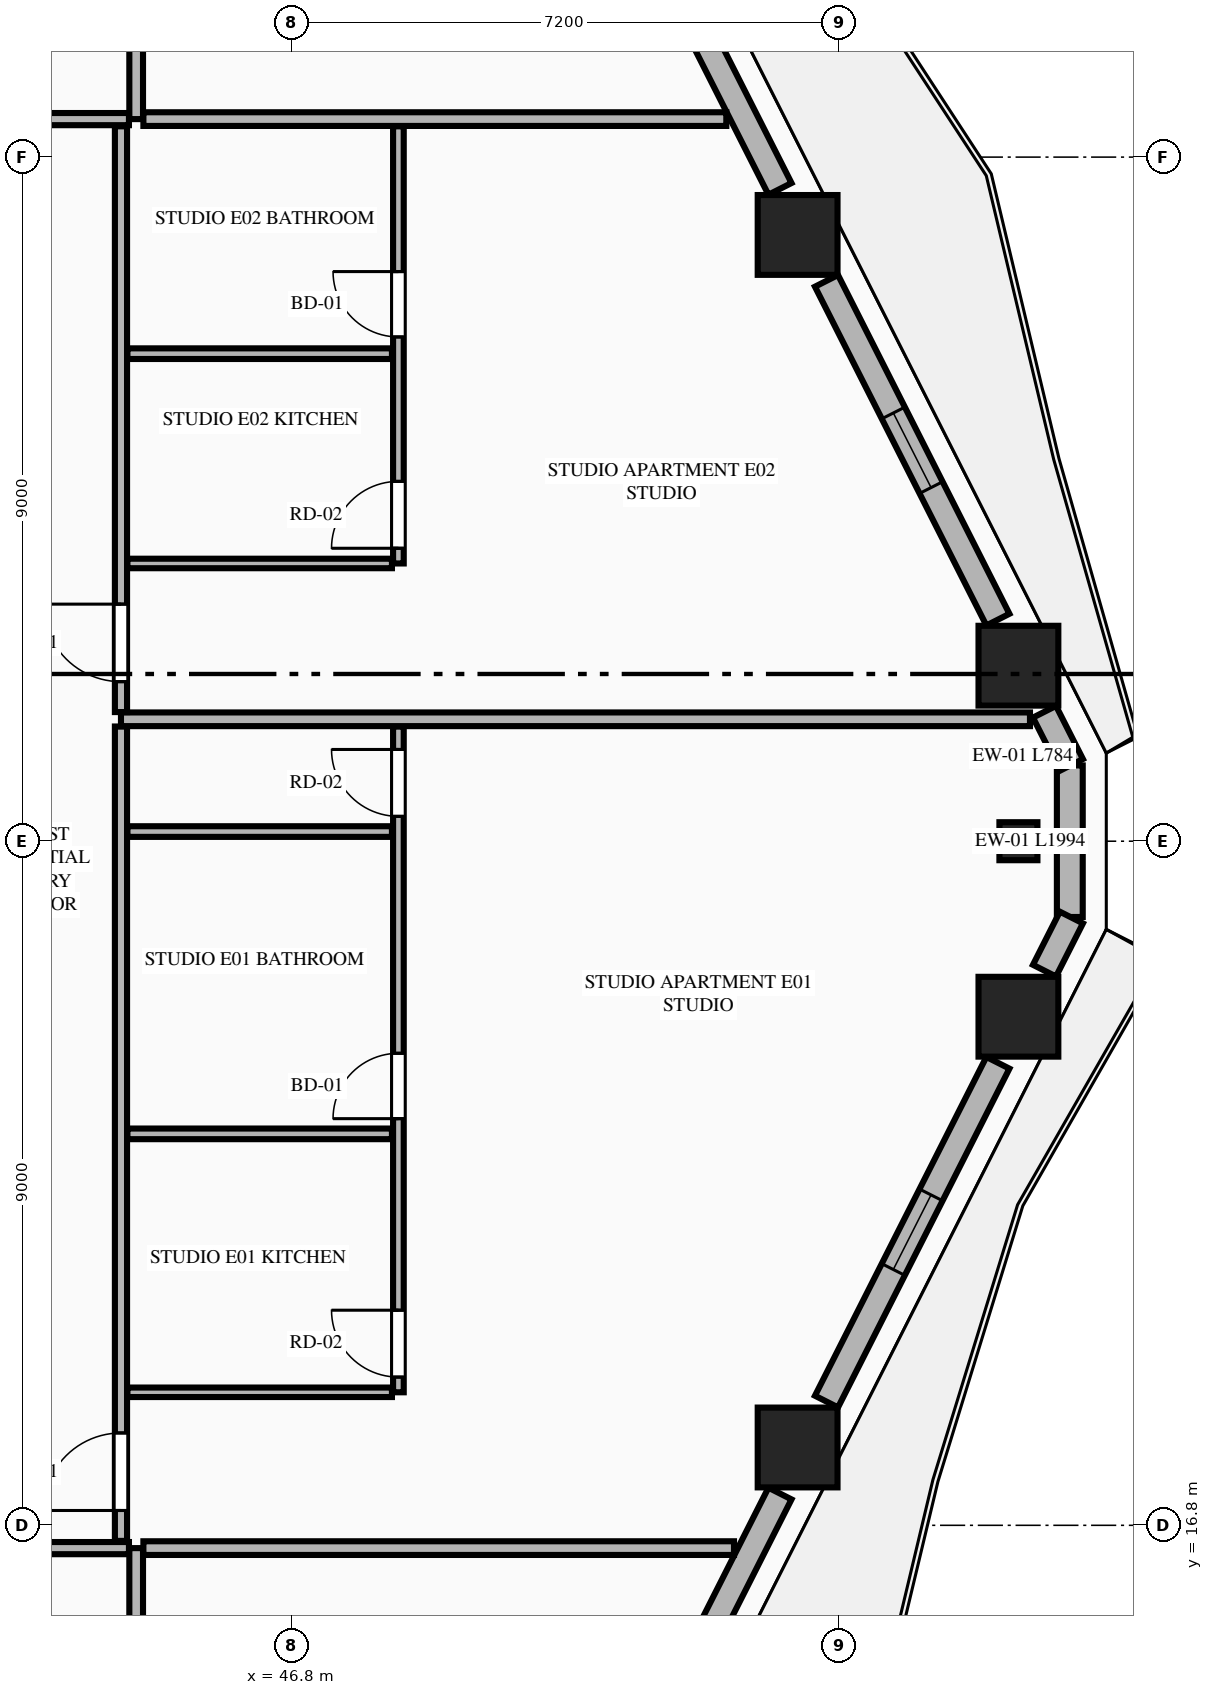
"""IFC4 building model, lengths in metres.
Left out: names, types, materials, properties, quantities, classifications, styles, units other than length and angle.
Written with IfcOpenShell. Run it as: python <this file> out.ifc"""

import sys

from ifc_helpers import new_model, si_unit, direction, frame, frame_2d, origin, origin_2d, place, context, subcontext, project, spatial, rectangle, extrude, element, fill, save


model = new_model("IFC4")
c1 = context("Model", 3, precision=1e-05, world=origin(), true_north=direction((0.0, 1.0)))
c2 = subcontext(c1, "Body", "Model", "MODEL_VIEW")
j1 = project(units=[si_unit("LENGTHUNIT", "METRE"), si_unit("PLANEANGLEUNIT", "RADIAN")], contexts=[c1])
p1 = place(None, origin())
s1 = spatial("IfcSite", under=j1, at=p1, CompositionType="ELEMENT")
p2 = place(p1, origin())
s2 = spatial("IfcBuilding", under=s1, at=p2, CompositionType="ELEMENT")
p3 = place(p2, frame((0.0, 0.0, 144.55)))
s3 = spatial("IfcBuildingStorey", under=s2, at=p3, CompositionType="ELEMENT", Elevation=144.55)
for number, where, z_axis, x_axis in (
    (1, (53.452, 17.824, 0.0), (0.0, 0.0, 1.0), (1.0, 0.0, 0.0)),
    (2, (56.357, 23.491, 0.0), (0.0, 0.0, 1.0), (1.0, 0.0, 0.0)),
    (3, (56.357, 28.109, 0.0), (0.0, 0.0, 1.0), (1.0, 0.0, 0.0)),
    (4, (53.452, 33.776, 0.0), (0.0, 0.0, 1.0), (1.0, 0.0, 0.0)),
):
    element("IfcColumn", number, at=place(p3, frame(where, z_axis=z_axis, x_axis=x_axis)), inside=s3, PredefinedType="COLUMN", context=c2, shape_type="SweptSolid", body=[
        extrude(rectangle(XDim=1.05, YDim=1.05, at=origin_2d()), origin(), (0.0, 0.0, 1.0), 3.55),
    ])
p4 = place(p3, frame((56.357, 25.8, 0.0), z_axis=(0.0, 0.0, 1.0), x_axis=(0.0, 1.0, 0.0)))
e5 = element("IfcColumn", 5, at=p4, inside=s3, PredefinedType="PILASTER", context=c2, shape_type="SweptSolid", body=[
    extrude(rectangle(XDim=0.5, YDim=0.35, at=origin_2d()), origin(), (0.0, 0.0, 1.0), 3.55),
])
p5 = place(p3, frame((57.033, 24.803, 0.0), z_axis=(0.0, 0.0, 1.0), x_axis=(0.0, 1.0, 0.0)))
e6 = element("IfcWall", 6, at=p5, inside=s3, PredefinedType="STANDARD", context=c2, shape_type="SweptSolid", body=[
    extrude(rectangle(XDim=1.994, YDim=0.34, at=frame_2d((0.997, 0.0))), origin(), (0.0, 0.0, 1.0), 3.27),
])
p6 = place(p3, frame((50.863, 12.561, 0.0), z_axis=(0.0, 0.0, 1.0), x_axis=(0.451567731634, 0.892236842855, 0.0)))
e7 = element("IfcWall", 7, at=p6, inside=s3, PredefinedType="STANDARD", context=c2, shape_type="SweptSolid", body=[
    extrude(rectangle(XDim=5.219, YDim=0.34, at=frame_2d((2.61, 0.0))), origin(), (0.0, 0.0, 1.0), 2.727),
])
p7 = place(p6, frame((1.532, 0.0, 0.0)))
e8 = element("IfcOpeningElement", 8, at=p7, cuts=e7, PredefinedType="OPENING", context=c2, shape_type="SweptSolid", body=[
    extrude(rectangle(XDim=1.1, YDim=2.25, at=frame_2d((0.55, 1.125))), frame((0.0, 0.18, 0.0), z_axis=(0.0, -1.0, 0.0), x_axis=(1.0, 0.0, 0.0)), (0.0, 0.0, 1.0), 0.36),
])
p8 = place(p3, frame((53.832, 18.428, 0.0), z_axis=(0.0, 0.0, 1.0), x_axis=(0.451431617681, 0.892305718102, 0.0)))
e9 = element("IfcWall", 9, at=p8, inside=s3, PredefinedType="STANDARD", context=c2, shape_type="SweptSolid", body=[
    extrude(rectangle(XDim=4.995, YDim=0.34, at=frame_2d((2.498, 0.0))), origin(), (0.0, 0.0, 1.0), 2.727),
])
p9 = place(p8, frame((1.947, 0.0, 0.75)))
e10 = element("IfcOpeningElement", 10, at=p9, cuts=e9, PredefinedType="OPENING", context=c2, shape_type="SweptSolid", body=[
    extrude(rectangle(XDim=1.1, YDim=1.827, at=frame_2d((0.55, 0.914))), frame((0.0, 0.18, 0.0), z_axis=(0.0, -1.0, 0.0), x_axis=(1.0, 0.0, 0.0)), (0.0, 0.0, 1.0), 0.36),
])
for number, where, z_axis, x_axis in (
    (11, (56.7, 24.097, 0.0), (0.0, 0.0, 1.0), (0.452, 0.892, 0.0)),
    (12, (57.054, 26.804, 0.0), (0.0, 0.0, 1.0), (-0.452, 0.892, 0.0)),
):
    element("IfcWall", number, at=place(p3, frame(where, z_axis=z_axis, x_axis=x_axis)), inside=s3, PredefinedType="STANDARD", context=c2, shape_type="SweptSolid", body=[
        extrude(rectangle(XDim=0.783, YDim=0.34, at=frame_2d((0.392, 0.0))), origin(), (0.0, 0.0, 1.0), 3.27),
    ])
p10 = place(p3, frame((56.087, 28.715, 0.0), z_axis=(0.0, 0.0, 1.0), x_axis=(-0.451431617681, 0.892305718102, 0.0)))
e13 = element("IfcWall", 13, at=p10, inside=s3, PredefinedType="STANDARD", context=c2, shape_type="SweptSolid", body=[
    extrude(rectangle(XDim=4.995, YDim=0.34, at=frame_2d((2.498, 0.0))), origin(), (0.0, 0.0, 1.0), 2.727),
])
p11 = place(p10, frame((1.947, 0.0, 0.75)))
e14 = element("IfcOpeningElement", 14, at=p11, cuts=e13, PredefinedType="OPENING", context=c2, shape_type="SweptSolid", body=[
    extrude(rectangle(XDim=1.1, YDim=1.827, at=frame_2d((0.55, 0.914))), frame((0.0, 0.18, 0.0), z_axis=(0.0, -1.0, 0.0), x_axis=(1.0, 0.0, 0.0)), (0.0, 0.0, 1.0), 0.36),
])
p12 = place(p3, frame((53.22, 34.382, 0.0), z_axis=(0.0, 0.0, 1.0), x_axis=(-0.451567731634, 0.892236842855, 0.0)))
e15 = element("IfcWall", 15, at=p12, inside=s3, PredefinedType="STANDARD", context=c2, shape_type="SweptSolid", body=[
    extrude(rectangle(XDim=5.219, YDim=0.34, at=frame_2d((2.61, 0.0))), origin(), (0.0, 0.0, 1.0), 2.727),
])
p13 = place(p12, frame((2.699, 0.0, 0.0)))
e16 = element("IfcOpeningElement", 16, at=p13, cuts=e15, PredefinedType="OPENING", context=c2, shape_type="SweptSolid", body=[
    extrude(rectangle(XDim=1.1, YDim=2.25, at=frame_2d((0.55, 1.125))), frame((0.0, 0.18, 0.0), z_axis=(0.0, -1.0, 0.0), x_axis=(1.0, 0.0, 0.0)), (0.0, 0.0, 1.0), 0.36),
])
p14 = place(p3, frame((44.75, 4.105, 0.0), z_axis=(0.0, 0.0, 1.0), x_axis=(0.0, 1.0, 0.0)))
e17 = element("IfcWall", 17, at=p14, inside=s3, PredefinedType="PARTITIONING", context=c2, shape_type="SweptSolid", body=[
    extrude(rectangle(XDim=12.395, YDim=0.18, at=frame_2d((6.198, 0.0))), origin(), (0.0, 0.0, 1.0), 3.27),
])
p15 = place(p3, frame((20.145, 16.5, 0.0), z_axis=(0.0, 0.0, 1.0), x_axis=(1.0, 0.0, 0.0)))
e18 = element("IfcWall", 18, at=p15, inside=s3, PredefinedType="PARTITIONING", context=c2, shape_type="SweptSolid", body=[
    extrude(rectangle(XDim=24.51, YDim=0.16, at=frame_2d((12.255, 0.0))), origin(), (0.0, 0.0, 1.0), 3.27),
])
p16 = place(p15, frame((0.405, 0.0, 0.0)))
e19 = element("IfcOpeningElement", 19, at=p16, cuts=e18, PredefinedType="OPENING", context=c2, shape_type="SweptSolid", body=[
    extrude(rectangle(XDim=1.35, YDim=2.35, at=frame_2d((0.675, 1.175))), frame((0.0, 0.09, 0.0), z_axis=(0.0, -1.0, 0.0), x_axis=(1.0, 0.0, 0.0)), (0.0, 0.0, 1.0), 0.18),
])
p17 = place(p3, frame((44.75, 35.3, 0.0), z_axis=(0.0, 0.0, 1.0), x_axis=(0.0, 1.0, 0.0)))
e20 = element("IfcWall", 20, at=p17, inside=s3, PredefinedType="PARTITIONING", context=c2, shape_type="SweptSolid", body=[
    extrude(rectangle(XDim=12.195, YDim=0.18, at=frame_2d((6.098, 0.0))), origin(), (0.0, 0.0, 1.0), 3.27),
])
p18 = place(p3, frame((20.145, 35.3, 0.0), z_axis=(0.0, 0.0, 1.0), x_axis=(1.0, 0.0, 0.0)))
e21 = element("IfcWall", 21, at=p18, inside=s3, PredefinedType="PARTITIONING", context=c2, shape_type="SweptSolid", body=[
    extrude(rectangle(XDim=24.51, YDim=0.16, at=frame_2d((12.255, 0.0))), origin(), (0.0, 0.0, 1.0), 3.27),
])
p19 = place(p18, frame((0.405, 0.0, 0.0)))
e22 = element("IfcOpeningElement", 22, at=p19, cuts=e21, PredefinedType="OPENING", context=c2, shape_type="SweptSolid", body=[
    extrude(rectangle(XDim=1.35, YDim=2.35, at=frame_2d((0.675, 1.175))), frame((0.0, 0.09, 0.0), z_axis=(0.0, -1.0, 0.0), x_axis=(1.0, 0.0, 0.0)), (0.0, 0.0, 1.0), 0.18),
])
p20 = place(p3, frame((44.845, 16.5, 0.0), z_axis=(0.0, 0.0, 1.0), x_axis=(1.0, 0.0, 0.0)))
e23 = element("IfcWall", 23, at=p20, inside=s3, PredefinedType="PARTITIONING", context=c2, shape_type="SweptSolid", body=[
    extrude(rectangle(XDim=7.77, YDim=0.18, at=frame_2d((3.885, 0.0))), origin(), (0.0, 0.0, 1.0), 3.27),
])
p21 = place(p3, frame((44.845, 35.3, 0.0), z_axis=(0.0, 0.0, 1.0), x_axis=(1.0, 0.0, 0.0)))
e24 = element("IfcWall", 24, at=p21, inside=s3, PredefinedType="PARTITIONING", context=c2, shape_type="SweptSolid", body=[
    extrude(rectangle(XDim=7.669, YDim=0.18, at=frame_2d((3.834, 0.0))), origin(), (0.0, 0.0, 1.0), 3.27),
])
p22 = place(p3, frame((44.55, 16.595, 0.0), z_axis=(0.0, 0.0, 1.0), x_axis=(0.0, 1.0, 0.0)))
e25 = element("IfcWall", 25, at=p22, inside=s3, PredefinedType="PARTITIONING", context=c2, shape_type="SweptSolid", body=[
    extrude(rectangle(XDim=10.714, YDim=0.16, at=frame_2d((5.357, 0.0))), origin(), (0.0, 0.0, 1.0), 3.27),
])
p23 = place(p22, frame((0.4, 0.0, 0.0)))
e26 = element("IfcOpeningElement", 26, at=p23, cuts=e25, PredefinedType="OPENING", context=c2, shape_type="SweptSolid", body=[
    extrude(rectangle(XDim=1.02, YDim=2.25, at=frame_2d((0.51, 1.125))), frame((0.0, 0.09, 0.0), z_axis=(0.0, -1.0, 0.0), x_axis=(1.0, 0.0, 0.0)), (0.0, 0.0, 1.0), 0.18),
])
p24 = place(p3, frame((44.635, 18.55, 0.0), z_axis=(0.0, 0.0, 1.0), x_axis=(1.0, 0.0, 0.0)))
e27 = element("IfcWall", 27, at=p24, inside=s3, PredefinedType="PARTITIONING", context=c2, shape_type="SweptSolid", body=[
    extrude(rectangle(XDim=3.48, YDim=0.125, at=frame_2d((1.74, 0.0))), origin(), (0.0, 0.0, 1.0), 2.652),
])
p25 = place(p3, frame((48.2, 18.55, 0.0), z_axis=(0.0, 0.0, 1.0), x_axis=(0.0, 1.0, 0.0)))
e28 = element("IfcWall", 28, at=p25, inside=s3, PredefinedType="PLUMBINGWALL", context=c2, shape_type="SweptSolid", body=[
    extrude(rectangle(XDim=8.759, YDim=0.14, at=frame_2d((4.379, 0.0))), origin(), (0.0, 0.0, 1.0), 3.27),
])
p26 = place(p25, frame((3.6, 0.0, 0.0)))
e29 = element("IfcOpeningElement", 29, at=p26, cuts=e28, PredefinedType="OPENING", context=c2, shape_type="SweptSolid", body=[
    extrude(rectangle(XDim=0.86, YDim=2.1, at=frame_2d((0.43, 1.05))), frame((0.0, 0.08, 0.0), z_axis=(0.0, -1.0, 0.0), x_axis=(1.0, 0.0, 0.0)), (0.0, 0.0, 1.0), 0.16),
])
p27 = place(p25, frame((7.577, 0.0, 0.0)))
e30 = element("IfcOpeningElement", 30, at=p27, cuts=e28, PredefinedType="OPENING", context=c2, shape_type="SweptSolid", body=[
    extrude(rectangle(XDim=0.88, YDim=2.15, at=frame_2d((0.44, 1.075))), frame((0.0, 0.08, 0.0), z_axis=(0.0, -1.0, 0.0), x_axis=(1.0, 0.0, 0.0)), (0.0, 0.0, 1.0), 0.16),
])
p28 = place(p25, frame((0.2, 0.0, 0.0)))
e31 = element("IfcOpeningElement", 31, at=p28, cuts=e28, PredefinedType="OPENING", context=c2, shape_type="SweptSolid", body=[
    extrude(rectangle(XDim=0.88, YDim=2.15, at=frame_2d((0.44, 1.075))), frame((0.0, 0.08, 0.0), z_axis=(0.0, -1.0, 0.0), x_axis=(1.0, 0.0, 0.0)), (0.0, 0.0, 1.0), 0.16),
])
for number, where, z_axis, x_axis in (
    (32, (44.635, 21.95, 0.0), (0.0, 0.0, 1.0), (1.0, 0.0, 0.0)),
    (33, (44.635, 25.927, 0.0), (0.0, 0.0, 1.0), (1.0, 0.0, 0.0)),
):
    element("IfcWall", number, at=place(p3, frame(where, z_axis=z_axis, x_axis=x_axis)), inside=s3, PredefinedType="PLUMBINGWALL", context=c2, shape_type="SweptSolid", body=[
        extrude(rectangle(XDim=3.48, YDim=0.14, at=frame_2d((1.74, 0.0))), origin(), (0.0, 0.0, 1.0), 3.27),
    ])
p29 = place(p3, frame((44.55, 27.404, 0.0), z_axis=(0.0, 0.0, 1.0), x_axis=(1.0, 0.0, 0.0)))
e34 = element("IfcWall", 34, at=p29, inside=s3, PredefinedType="PARTITIONING", context=c2, shape_type="SweptSolid", body=[
    extrude(rectangle(XDim=11.959, YDim=0.18, at=frame_2d((5.979, 0.0))), origin(), (0.0, 0.0, 1.0), 3.27),
])
p30 = place(p3, frame((44.55, 27.499, 0.0), z_axis=(0.0, 0.0, 1.0), x_axis=(0.0, 1.0, 0.0)))
e35 = element("IfcWall", 35, at=p30, inside=s3, PredefinedType="PARTITIONING", context=c2, shape_type="SweptSolid", body=[
    extrude(rectangle(XDim=7.706, YDim=0.16, at=frame_2d((3.853, 0.0))), origin(), (0.0, 0.0, 1.0), 3.27),
])
p31 = place(p30, frame((0.4, 0.0, 0.0)))
e36 = element("IfcOpeningElement", 36, at=p31, cuts=e35, PredefinedType="OPENING", context=c2, shape_type="SweptSolid", body=[
    extrude(rectangle(XDim=1.02, YDim=2.25, at=frame_2d((0.51, 1.125))), frame((0.0, 0.09, 0.0), z_axis=(0.0, -1.0, 0.0), x_axis=(1.0, 0.0, 0.0)), (0.0, 0.0, 1.0), 0.18),
])
p32 = place(p3, frame((44.635, 29.454, 0.0), z_axis=(0.0, 0.0, 1.0), x_axis=(1.0, 0.0, 0.0)))
e37 = element("IfcWall", 37, at=p32, inside=s3, PredefinedType="PARTITIONING", context=c2, shape_type="SweptSolid", body=[
    extrude(rectangle(XDim=3.48, YDim=0.125, at=frame_2d((1.74, 0.0))), origin(), (0.0, 0.0, 1.0), 3.27),
])
p33 = place(p3, frame((48.2, 29.454, 0.0), z_axis=(0.0, 0.0, 1.0), x_axis=(0.0, 1.0, 0.0)))
e38 = element("IfcWall", 38, at=p33, inside=s3, PredefinedType="PLUMBINGWALL", context=c2, shape_type="SweptSolid", body=[
    extrude(rectangle(XDim=5.751, YDim=0.14, at=frame_2d((2.875, 0.0))), origin(), (0.0, 0.0, 1.0), 3.27),
])
p34 = place(p33, frame((2.98, 0.0, 0.0)))
e39 = element("IfcOpeningElement", 39, at=p34, cuts=e38, PredefinedType="OPENING", context=c2, shape_type="SweptSolid", body=[
    extrude(rectangle(XDim=0.86, YDim=2.1, at=frame_2d((0.43, 1.05))), frame((0.0, 0.08, 0.0), z_axis=(0.0, -1.0, 0.0), x_axis=(1.0, 0.0, 0.0)), (0.0, 0.0, 1.0), 0.16),
])
p35 = place(p33, frame((0.2, 0.0, 0.0)))
e40 = element("IfcOpeningElement", 40, at=p35, cuts=e38, PredefinedType="OPENING", context=c2, shape_type="SweptSolid", body=[
    extrude(rectangle(XDim=0.88, YDim=2.15, at=frame_2d((0.44, 1.075))), frame((0.0, 0.08, 0.0), z_axis=(0.0, -1.0, 0.0), x_axis=(1.0, 0.0, 0.0)), (0.0, 0.0, 1.0), 0.16),
])
p36 = place(p3, frame((44.635, 32.214, 0.0), z_axis=(0.0, 0.0, 1.0), x_axis=(1.0, 0.0, 0.0)))
e41 = element("IfcWall", 41, at=p36, inside=s3, PredefinedType="PLUMBINGWALL", context=c2, shape_type="SweptSolid", body=[
    extrude(rectangle(XDim=3.48, YDim=0.14, at=frame_2d((1.74, 0.0))), origin(), (0.0, 0.0, 1.0), 3.27),
])
p37 = place(p9, origin())
e42 = element("IfcWindow", 42, at=p37, inside=s3, PartitioningType="SINGLE_PANEL", PredefinedType="WINDOW", context=c2, shape_type="SweptSolid", body=[
    extrude(rectangle(XDim=1.1, YDim=1.827, at=frame_2d((0.55, 0.914))), frame((0.0, 0.03, 0.0), z_axis=(0.0, -1.0, 0.0), x_axis=(1.0, 0.0, 0.0)), (0.0, 0.0, 1.0), 0.06),
])
fill(e10, e42)
p38 = place(p11, origin())
e43 = element("IfcWindow", 43, at=p38, inside=s3, PartitioningType="SINGLE_PANEL", PredefinedType="WINDOW", context=c2, shape_type="SweptSolid", body=[
    extrude(rectangle(XDim=1.1, YDim=1.827, at=frame_2d((0.55, 0.914))), frame((0.0, 0.03, 0.0), z_axis=(0.0, -1.0, 0.0), x_axis=(1.0, 0.0, 0.0)), (0.0, 0.0, 1.0), 0.06),
])
fill(e14, e43)
p39 = place(p26, origin())
e44 = element("IfcDoor", 44, at=p39, inside=s3, OperationType="SINGLE_SWING_LEFT", PredefinedType="DOOR", context=c2, shape_type="SweptSolid", body=[
    extrude(rectangle(XDim=0.86, YDim=2.1, at=frame_2d((0.43, 1.05))), frame((0.0, 0.025, 0.0), z_axis=(0.0, -1.0, 0.0), x_axis=(1.0, 0.0, 0.0)), (0.0, 0.0, 1.0), 0.05),
])
fill(e29, e44)
p40 = place(p27, origin())
e45 = element("IfcDoor", 45, at=p40, inside=s3, OperationType="SINGLE_SWING_RIGHT", PredefinedType="DOOR", context=c2, shape_type="SweptSolid", body=[
    extrude(rectangle(XDim=0.88, YDim=2.15, at=frame_2d((0.44, 1.075))), frame((0.0, 0.025, 0.0), z_axis=(0.0, -1.0, 0.0), x_axis=(1.0, 0.0, 0.0)), (0.0, 0.0, 1.0), 0.05),
])
fill(e30, e45)
p41 = place(p23, origin())
e46 = element("IfcDoor", 46, at=p41, inside=s3, OperationType="SINGLE_SWING_LEFT", PredefinedType="DOOR", context=c2, shape_type="SweptSolid", body=[
    extrude(rectangle(XDim=1.02, YDim=2.25, at=frame_2d((0.51, 1.125))), frame((0.0, 0.025, 0.0), z_axis=(0.0, -1.0, 0.0), x_axis=(1.0, 0.0, 0.0)), (0.0, 0.0, 1.0), 0.05),
])
fill(e26, e46)
p42 = place(p28, origin())
e47 = element("IfcDoor", 47, at=p42, inside=s3, OperationType="SINGLE_SWING_RIGHT", PredefinedType="DOOR", context=c2, shape_type="SweptSolid", body=[
    extrude(rectangle(XDim=0.88, YDim=2.15, at=frame_2d((0.44, 1.075))), frame((0.0, 0.025, 0.0), z_axis=(0.0, -1.0, 0.0), x_axis=(1.0, 0.0, 0.0)), (0.0, 0.0, 1.0), 0.05),
])
fill(e31, e47)
p43 = place(p34, origin())
e48 = element("IfcDoor", 48, at=p43, inside=s3, OperationType="SINGLE_SWING_RIGHT", PredefinedType="DOOR", context=c2, shape_type="SweptSolid", body=[
    extrude(rectangle(XDim=0.86, YDim=2.1, at=frame_2d((0.43, 1.05))), frame((0.0, 0.025, 0.0), z_axis=(0.0, -1.0, 0.0), x_axis=(1.0, 0.0, 0.0)), (0.0, 0.0, 1.0), 0.05),
])
fill(e39, e48)
p44 = place(p31, origin())
e49 = element("IfcDoor", 49, at=p44, inside=s3, OperationType="SINGLE_SWING_RIGHT", PredefinedType="DOOR", context=c2, shape_type="SweptSolid", body=[
    extrude(rectangle(XDim=1.02, YDim=2.25, at=frame_2d((0.51, 1.125))), frame((0.0, 0.025, 0.0), z_axis=(0.0, -1.0, 0.0), x_axis=(1.0, 0.0, 0.0)), (0.0, 0.0, 1.0), 0.05),
])
fill(e36, e49)
p45 = place(p35, origin())
e50 = element("IfcDoor", 50, at=p45, inside=s3, OperationType="SINGLE_SWING_LEFT", PredefinedType="DOOR", context=c2, shape_type="SweptSolid", body=[
    extrude(rectangle(XDim=0.88, YDim=2.15, at=frame_2d((0.44, 1.075))), frame((0.0, 0.025, 0.0), z_axis=(0.0, -1.0, 0.0), x_axis=(1.0, 0.0, 0.0)), (0.0, 0.0, 1.0), 0.05),
])
fill(e40, e50)
save(model, sys.argv[1])
